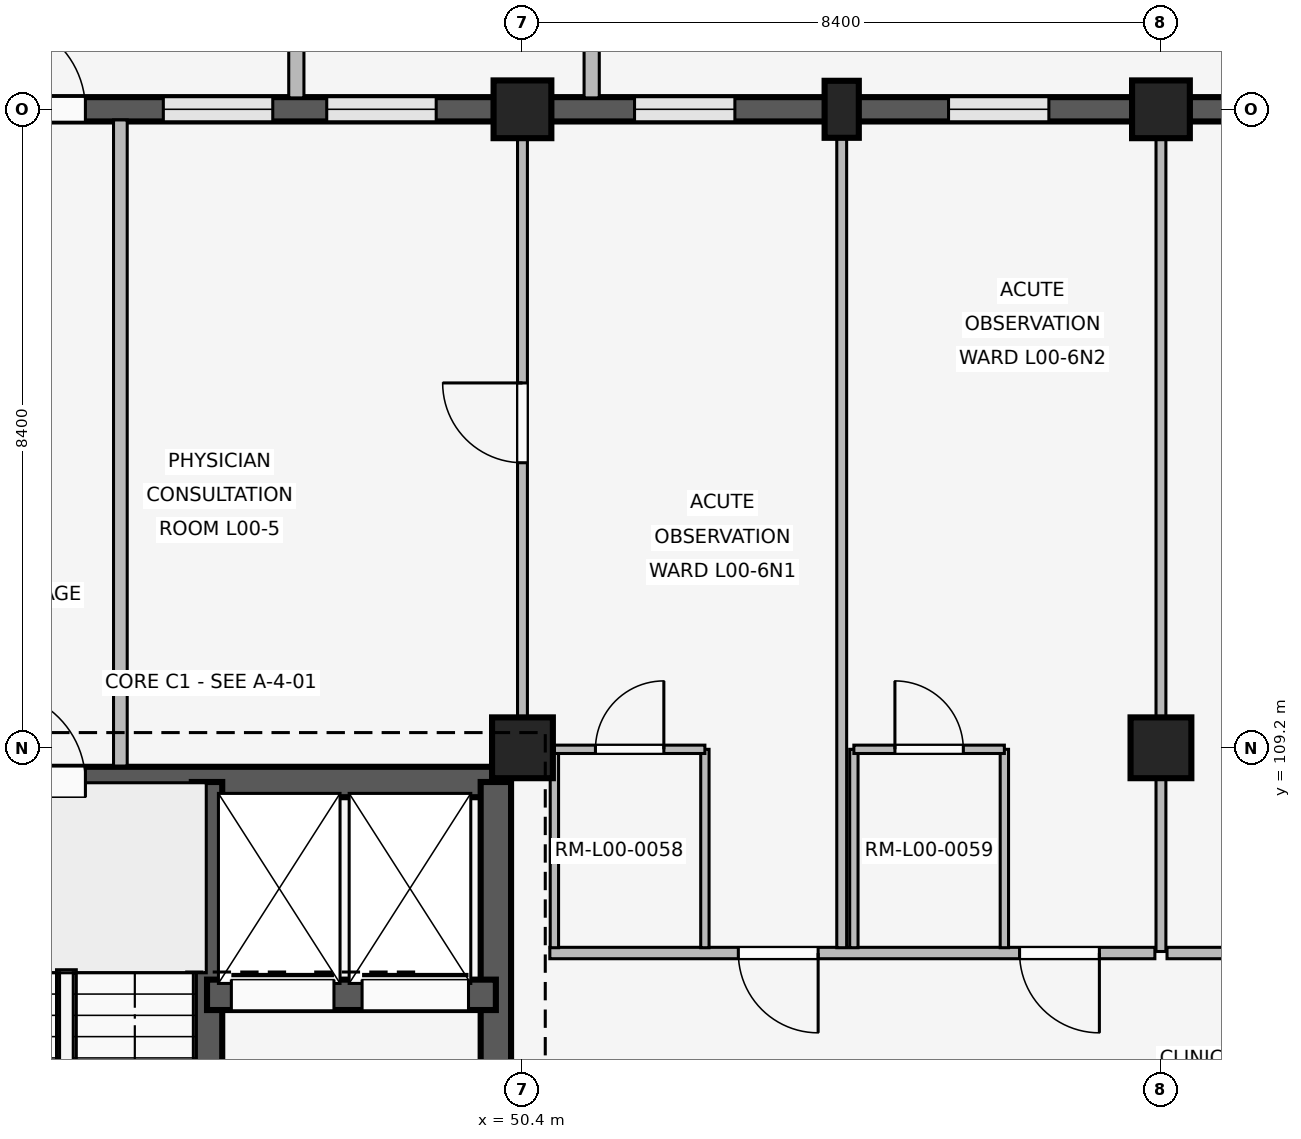
"""IFC4 building model, lengths in metres.
Left out: names, types, materials, properties, quantities, classifications, styles, units other than length and angle.
Written with IfcOpenShell. Run it as: python <this file> out.ifc"""

import sys

from ifc_helpers import new_model, si_unit, direction, frame, frame_2d, origin, origin_2d, place, context, subcontext, project, spatial, rectangle, extrude, element, fill, save


model = new_model("IFC4")
c1 = context("Model", 3, precision=1e-05, world=origin(), true_north=direction((0.0, 1.0)))
c2 = subcontext(c1, "Body", "Model", "MODEL_VIEW")
j1 = project(units=[si_unit("LENGTHUNIT", "METRE"), si_unit("PLANEANGLEUNIT", "RADIAN")], contexts=[c1])
p1 = place(None, origin())
s1 = spatial("IfcSite", under=j1, at=p1, CompositionType="ELEMENT")
p2 = place(p1, origin())
s2 = spatial("IfcBuilding", under=s1, at=p2, CompositionType="ELEMENT")
p3 = place(p2, origin())
s3 = spatial("IfcBuildingStorey", under=s2, at=p3, CompositionType="ELEMENT", Elevation=0.0)
p4 = place(p3, frame((50.4, 109.2, 0.0), z_axis=(0.0, 0.0, 1.0), x_axis=(1.0, 0.0, 0.0)))
e1 = element("IfcColumn", 1, at=p4, inside=s3, PredefinedType="COLUMN", context=c2, shape_type="SweptSolid", body=[
    extrude(rectangle(XDim=0.8, YDim=0.8, at=origin_2d()), origin(), (0.0, 0.0, 1.0), 4.8),
])
p5 = place(p3, frame((50.4, 117.6, 0.0), z_axis=(0.0, 0.0, 1.0), x_axis=(1.0, 0.0, 0.0)))
e2 = element("IfcColumn", 2, at=p5, inside=s3, PredefinedType="COLUMN", context=c2, shape_type="SweptSolid", body=[
    extrude(rectangle(XDim=0.76, YDim=0.76, at=origin_2d()), origin(), (0.0, 0.0, 1.0), 4.8),
])
p6 = place(p3, frame((58.8, 109.2, 0.0), z_axis=(0.0, 0.0, 1.0), x_axis=(1.0, 0.0, 0.0)))
e3 = element("IfcColumn", 3, at=p6, inside=s3, PredefinedType="COLUMN", context=c2, shape_type="SweptSolid", body=[
    extrude(rectangle(XDim=0.8, YDim=0.8, at=origin_2d()), origin(), (0.0, 0.0, 1.0), 4.8),
])
p7 = place(p3, frame((58.8, 117.6, 0.0), z_axis=(0.0, 0.0, 1.0), x_axis=(1.0, 0.0, 0.0)))
e4 = element("IfcColumn", 4, at=p7, inside=s3, PredefinedType="COLUMN", context=c2, shape_type="SweptSolid", body=[
    extrude(rectangle(XDim=0.76, YDim=0.76, at=origin_2d()), origin(), (0.0, 0.0, 1.0), 4.8),
])
p8 = place(p3, frame((54.6, 117.6, 0.0), z_axis=(0.0, 0.0, 1.0), x_axis=(1.0, 0.0, 0.0)))
e5 = element("IfcColumn", 5, at=p8, inside=s3, PredefinedType="PILASTER", context=c2, shape_type="SweptSolid", body=[
    extrude(rectangle(XDim=0.45, YDim=0.75, at=origin_2d()), origin(), (0.0, 0.0, 1.0), 4.8),
])
p9 = place(p3, frame((42.375, 117.6, 0.0), z_axis=(0.0, 0.0, 1.0), x_axis=(1.0, 0.0, 0.0)))
e6 = element("IfcWall", 6, at=p9, inside=s3, PredefinedType="SOLIDWALL", context=c2, shape_type="SweptSolid", body=[
    extrude(rectangle(XDim=7.65, YDim=0.32, at=frame_2d((3.825, 0.0))), origin(), (0.0, 0.0, 1.0), 3.82),
])
p10 = place(p9, frame((1.075, 0.0, 0.0)))
e7 = element("IfcOpeningElement", 7, at=p10, cuts=e6, PredefinedType="OPENING", context=c2, shape_type="SweptSolid", body=[
    extrude(rectangle(XDim=1.2, YDim=2.25, at=frame_2d((0.6, 1.125))), frame((0.0, 0.17, 0.0), z_axis=(0.0, -1.0, 0.0), x_axis=(1.0, 0.0, 0.0)), (0.0, 0.0, 1.0), 0.34),
])
p11 = place(p9, frame((3.3, 0.0, 0.85)))
e8 = element("IfcOpeningElement", 8, at=p11, cuts=e6, PredefinedType="OPENING", context=c2, shape_type="SweptSolid", body=[
    extrude(rectangle(XDim=1.44, YDim=1.62, at=frame_2d((0.72, 0.81))), frame((0.0, 0.17, 0.0), z_axis=(0.0, -1.0, 0.0), x_axis=(1.0, 0.0, 0.0)), (0.0, 0.0, 1.0), 0.34),
])
p12 = place(p9, frame((5.45, 0.0, 0.85)))
e9 = element("IfcOpeningElement", 9, at=p12, cuts=e6, PredefinedType="OPENING", context=c2, shape_type="SweptSolid", body=[
    extrude(rectangle(XDim=1.44, YDim=1.62, at=frame_2d((0.72, 0.81))), frame((0.0, 0.17, 0.0), z_axis=(0.0, -1.0, 0.0), x_axis=(1.0, 0.0, 0.0)), (0.0, 0.0, 1.0), 0.34),
])
p13 = place(p3, frame((47.425, 117.75, 0.0), z_axis=(0.0, 0.0, 1.0), x_axis=(0.0, 1.0, 0.0)))
e10 = element("IfcWall", 10, at=p13, inside=s3, PredefinedType="ELEMENTEDWALL", context=c2, shape_type="SweptSolid", body=[
    extrude(rectangle(XDim=0.85, YDim=0.2, at=frame_2d((0.425, 0.0))), origin(), (0.0, 0.0, 1.0), 3.8),
])
p14 = place(p3, frame((50.775, 117.6, 0.0), z_axis=(0.0, 0.0, 1.0), x_axis=(1.0, 0.0, 0.0)))
e11 = element("IfcWall", 11, at=p14, inside=s3, PredefinedType="SOLIDWALL", context=c2, shape_type="SweptSolid", body=[
    extrude(rectangle(XDim=7.65, YDim=0.32, at=frame_2d((3.825, 0.0))), origin(), (0.0, 0.0, 1.0), 3.82),
])
p15 = place(p14, frame((1.1, 0.0, 0.85)))
e12 = element("IfcOpeningElement", 12, at=p15, cuts=e11, PredefinedType="OPENING", context=c2, shape_type="SweptSolid", body=[
    extrude(rectangle(XDim=1.32, YDim=1.58, at=frame_2d((0.66, 0.79))), frame((0.0, 0.17, 0.0), z_axis=(0.0, -1.0, 0.0), x_axis=(1.0, 0.0, 0.0)), (0.0, 0.0, 1.0), 0.34),
])
p16 = place(p14, frame((5.23, 0.0, 0.85)))
e13 = element("IfcOpeningElement", 13, at=p16, cuts=e11, PredefinedType="OPENING", context=c2, shape_type="SweptSolid", body=[
    extrude(rectangle(XDim=1.32, YDim=1.58, at=frame_2d((0.66, 0.79))), frame((0.0, 0.17, 0.0), z_axis=(0.0, -1.0, 0.0), x_axis=(1.0, 0.0, 0.0)), (0.0, 0.0, 1.0), 0.34),
])
p17 = place(p3, frame((51.311, 117.75, 0.0), z_axis=(0.0, 0.0, 1.0), x_axis=(0.0, 1.0, 0.0)))
e14 = element("IfcWall", 14, at=p17, inside=s3, PredefinedType="ELEMENTEDWALL", context=c2, shape_type="SweptSolid", body=[
    extrude(rectangle(XDim=0.85, YDim=0.2, at=frame_2d((0.425, 0.0))), origin(), (0.0, 0.0, 1.0), 3.8),
])
p18 = place(p3, frame((59.175, 117.6, 0.0), z_axis=(0.0, 0.0, 1.0), x_axis=(1.0, 0.0, 0.0)))
e15 = element("IfcWall", 15, at=p18, inside=s3, PredefinedType="SOLIDWALL", context=c2, shape_type="SweptSolid", body=[
    extrude(rectangle(XDim=7.65, YDim=0.32, at=frame_2d((3.825, 0.0))), origin(), (0.0, 0.0, 1.0), 3.82),
])
p19 = place(p18, frame((2.825, 0.0, 0.0)))
e16 = element("IfcOpeningElement", 16, at=p19, cuts=e15, PredefinedType="OPENING", context=c2, shape_type="SweptSolid", body=[
    extrude(rectangle(XDim=2.0, YDim=2.4, at=frame_2d((1.0, 1.2))), frame((0.0, 0.17, 0.0), z_axis=(0.0, -1.0, 0.0), x_axis=(1.0, 0.0, 0.0)), (0.0, 0.0, 1.0), 0.34),
])
p20 = place(p3, frame((42.55, 108.75, 0.0), z_axis=(0.0, 0.0, 1.0), x_axis=(1.0, 0.0, 0.0)))
e17 = element("IfcWall", 17, at=p20, inside=s3, PredefinedType="SHEAR", context=c2, shape_type="SweptSolid", body=[
    extrude(rectangle(XDim=7.5, YDim=0.4, at=frame_2d((3.75, 0.0))), origin(), (0.0, 0.0, 1.0), 4.52),
])
p21 = place(p20, frame((0.9, 0.0, 0.0)))
e18 = element("IfcOpeningElement", 18, at=p21, cuts=e17, PredefinedType="OPENING", context=c2, shape_type="SweptSolid", body=[
    extrude(rectangle(XDim=1.2, YDim=2.1, at=frame_2d((0.6, 1.05))), frame((0.0, 0.21, 0.0), z_axis=(0.0, -1.0, 0.0), x_axis=(1.0, 0.0, 0.0)), (0.0, 0.0, 1.0), 0.42),
])
p22 = place(p3, frame((50.05, 101.2, 0.0), z_axis=(0.0, 0.0, 1.0), x_axis=(0.0, 1.0, 0.0)))
e19 = element("IfcWall", 19, at=p22, inside=s3, PredefinedType="SHEAR", context=c2, shape_type="SweptSolid", body=[
    extrude(rectangle(XDim=7.55, YDim=0.4, at=frame_2d((3.775, 0.0))), origin(), (0.0, 0.0, 1.0), 4.52),
])
p23 = place(p22, frame((2.4, 0.0, 0.0)))
e20 = element("IfcOpeningElement", 20, at=p23, cuts=e19, PredefinedType="OPENING", context=c2, shape_type="SweptSolid", body=[
    extrude(rectangle(XDim=1.2, YDim=2.2, at=frame_2d((0.6, 1.1))), frame((0.0, 0.21, 0.0), z_axis=(0.0, -1.0, 0.0), x_axis=(1.0, 0.0, 0.0)), (0.0, 0.0, 1.0), 0.42),
])
p24 = place(p3, frame((46.25, 101.2, 0.0), z_axis=(0.0, 0.0, 1.0), x_axis=(0.0, 1.0, 0.0)))
e21 = element("IfcWall", 21, at=p24, inside=s3, PredefinedType="SHEAR", context=c2, shape_type="SweptSolid", body=[
    extrude(rectangle(XDim=7.55, YDim=0.4, at=frame_2d((3.775, 0.0))), origin(), (0.0, 0.0, 1.0), 4.52),
])
p25 = place(p24, frame((0.28, 0.0, 0.0)))
e22 = element("IfcOpeningElement", 22, at=p25, cuts=e21, PredefinedType="OPENING", context=c2, shape_type="SweptSolid", body=[
    extrude(rectangle(XDim=1.0, YDim=2.15, at=frame_2d((0.5, 1.075))), frame((0.0, 0.21, 0.0), z_axis=(0.0, -1.0, 0.0), x_axis=(1.0, 0.0, 0.0)), (0.0, 0.0, 1.0), 0.42),
])
p26 = place(p3, frame((46.25, 105.95, 0.0), z_axis=(0.0, 0.0, 1.0), x_axis=(1.0, 0.0, 0.0)))
e23 = element("IfcWall", 23, at=p26, inside=s3, PredefinedType="SHEAR", context=c2, shape_type="SweptSolid", body=[
    extrude(rectangle(XDim=3.8, YDim=0.4, at=frame_2d((1.9, 0.0))), origin(), (0.0, 0.0, 1.0), 4.52),
])
p27 = place(p26, frame((0.32, 0.0, 0.0)))
e24 = element("IfcOpeningElement", 24, at=p27, cuts=e23, PredefinedType="OPENING", context=c2, shape_type="SweptSolid", body=[
    extrude(rectangle(XDim=1.35, YDim=2.25, at=frame_2d((0.675, 1.125))), frame((0.0, 0.21, 0.0), z_axis=(0.0, -1.0, 0.0), x_axis=(1.0, 0.0, 0.0)), (0.0, 0.0, 1.0), 0.42),
])
p28 = place(p26, frame((2.04, 0.0, 0.0)))
e25 = element("IfcOpeningElement", 25, at=p28, cuts=e23, PredefinedType="OPENING", context=c2, shape_type="SweptSolid", body=[
    extrude(rectangle(XDim=1.4, YDim=2.25, at=frame_2d((0.7, 1.125))), frame((0.0, 0.21, 0.0), z_axis=(0.0, -1.0, 0.0), x_axis=(1.0, 0.0, 0.0)), (0.0, 0.0, 1.0), 0.42),
])
p29 = place(p3, frame((45.11, 108.96, 0.0), z_axis=(0.0, 0.0, 1.0), x_axis=(0.0, 1.0, 0.0)))
e26 = element("IfcWall", 26, at=p29, inside=s3, PredefinedType="PARTITIONING", context=c2, shape_type="SweptSolid", body=[
    extrude(rectangle(XDim=8.5, YDim=0.18, at=frame_2d((4.25, 0.0))), origin(), (0.0, 0.0, 1.0), 3.8),
])
p30 = place(p3, frame((50.4, 109.55, 0.0), z_axis=(0.0, 0.0, 1.0), x_axis=(0.0, 1.0, 0.0)))
e27 = element("IfcWall", 27, at=p30, inside=s3, PredefinedType="PARTITIONING", context=c2, shape_type="SweptSolid", body=[
    extrude(rectangle(XDim=7.91, YDim=0.13, at=frame_2d((3.955, 0.0))), origin(), (0.0, 0.0, 1.0), 3.8),
])
p31 = place(p30, frame((3.4, 0.0, 0.0)))
e28 = element("IfcOpeningElement", 28, at=p31, cuts=e27, PredefinedType="OPENING", context=c2, shape_type="SweptSolid", body=[
    extrude(rectangle(XDim=1.05, YDim=2.2, at=frame_2d((0.525, 1.1))), frame((0.0, 0.075, 0.0), z_axis=(0.0, -1.0, 0.0), x_axis=(1.0, 0.0, 0.0)), (0.0, 0.0, 1.0), 0.15),
])
p32 = place(p3, frame((58.72, 106.5, 0.0), z_axis=(0.0, 0.0, 1.0), x_axis=(-1.0, 0.0, 0.0)))
e29 = element("IfcWall", 29, at=p32, inside=s3, PredefinedType="PARTITIONING", context=c2, shape_type="SweptSolid", body=[
    extrude(rectangle(XDim=7.96, YDim=0.15, at=frame_2d((3.98, 0.0))), origin(), (0.0, 0.0, 1.0), 3.8),
])
p33 = place(p32, frame((0.73, 0.0, 0.0)))
e30 = element("IfcOpeningElement", 30, at=p33, cuts=e29, PredefinedType="OPENING", context=c2, shape_type="SweptSolid", body=[
    extrude(rectangle(XDim=1.05, YDim=2.2, at=frame_2d((0.525, 1.1))), frame((0.0, 0.085, 0.0), z_axis=(0.0, -1.0, 0.0), x_axis=(1.0, 0.0, 0.0)), (0.0, 0.0, 1.0), 0.17),
])
p34 = place(p32, frame((4.43, 0.0, 0.0)))
e31 = element("IfcOpeningElement", 31, at=p34, cuts=e29, PredefinedType="OPENING", context=c2, shape_type="SweptSolid", body=[
    extrude(rectangle(XDim=1.05, YDim=2.2, at=frame_2d((0.525, 1.1))), frame((0.0, 0.085, 0.0), z_axis=(0.0, -1.0, 0.0), x_axis=(1.0, 0.0, 0.0)), (0.0, 0.0, 1.0), 0.17),
])
p35 = place(p3, frame((54.6, 106.57, 0.0), z_axis=(0.0, 0.0, 1.0), x_axis=(0.0, 1.0, 0.0)))
e32 = element("IfcWall", 32, at=p35, inside=s3, PredefinedType="PARTITIONING", context=c2, shape_type="SweptSolid", body=[
    extrude(rectangle(XDim=10.93, YDim=0.13, at=frame_2d((5.465, 0.0))), origin(), (0.0, 0.0, 1.0), 3.8),
])
for number, where, z_axis, x_axis in (
    (33, (50.82, 106.57, 0.0), (0.0, 0.0, 1.0), (0.0, 1.0, 0.0)),
    (34, (52.8, 106.57, 0.0), (0.0, 0.0, 1.0), (0.0, 1.0, 0.0)),
):
    element("IfcWall", number, at=place(p3, frame(where, z_axis=z_axis, x_axis=x_axis)), inside=s3, PredefinedType="PARTITIONING", context=c2, shape_type="SweptSolid", body=[
        extrude(rectangle(XDim=2.61, YDim=0.11, at=frame_2d((1.305, 0.0))), origin(), (0.0, 0.0, 1.0), 3.8),
    ])
p36 = place(p3, frame((50.82, 109.18, 0.0), z_axis=(0.0, 0.0, 1.0), x_axis=(1.0, 0.0, 0.0)))
e35 = element("IfcWall", 35, at=p36, inside=s3, PredefinedType="PARTITIONING", context=c2, shape_type="SweptSolid", body=[
    extrude(rectangle(XDim=1.98, YDim=0.11, at=frame_2d((0.99, 0.0))), origin(), (0.0, 0.0, 1.0), 3.8),
])
p37 = place(p36, frame((0.54, 0.0, 0.0)))
e36 = element("IfcOpeningElement", 36, at=p37, cuts=e35, PredefinedType="OPENING", context=c2, shape_type="SweptSolid", body=[
    extrude(rectangle(XDim=0.9, YDim=2.1, at=frame_2d((0.45, 1.05))), frame((0.0, 0.065, 0.0), z_axis=(0.0, -1.0, 0.0), x_axis=(1.0, 0.0, 0.0)), (0.0, 0.0, 1.0), 0.13),
])
for number, where, z_axis, x_axis in (
    (37, (54.76, 106.57, 0.0), (0.0, 0.0, 1.0), (0.0, 1.0, 0.0)),
    (38, (56.74, 106.57, 0.0), (0.0, 0.0, 1.0), (0.0, 1.0, 0.0)),
):
    element("IfcWall", number, at=place(p3, frame(where, z_axis=z_axis, x_axis=x_axis)), inside=s3, PredefinedType="PARTITIONING", context=c2, shape_type="SweptSolid", body=[
        extrude(rectangle(XDim=2.61, YDim=0.11, at=frame_2d((1.305, 0.0))), origin(), (0.0, 0.0, 1.0), 3.8),
    ])
p38 = place(p3, frame((54.76, 109.18, 0.0), z_axis=(0.0, 0.0, 1.0), x_axis=(1.0, 0.0, 0.0)))
e39 = element("IfcWall", 39, at=p38, inside=s3, PredefinedType="PARTITIONING", context=c2, shape_type="SweptSolid", body=[
    extrude(rectangle(XDim=1.98, YDim=0.11, at=frame_2d((0.99, 0.0))), origin(), (0.0, 0.0, 1.0), 3.8),
])
p39 = place(p38, frame((0.54, 0.0, 0.0)))
e40 = element("IfcOpeningElement", 40, at=p39, cuts=e39, PredefinedType="OPENING", context=c2, shape_type="SweptSolid", body=[
    extrude(rectangle(XDim=0.9, YDim=2.1, at=frame_2d((0.45, 1.05))), frame((0.0, 0.065, 0.0), z_axis=(0.0, -1.0, 0.0), x_axis=(1.0, 0.0, 0.0)), (0.0, 0.0, 1.0), 0.13),
])
p40 = place(p3, frame((58.8, 106.52, 0.0), z_axis=(0.0, 0.0, 1.0), x_axis=(0.0, 1.0, 0.0)))
e41 = element("IfcWall", 41, at=p40, inside=s3, PredefinedType="PARTITIONING", context=c2, shape_type="SweptSolid", body=[
    extrude(rectangle(XDim=10.94, YDim=0.13, at=frame_2d((5.47, 0.0))), origin(), (0.0, 0.0, 1.0), 3.8),
])
p41 = place(p3, frame((67.12, 106.5, 0.0), z_axis=(0.0, 0.0, 1.0), x_axis=(-1.0, 0.0, 0.0)))
e42 = element("IfcWall", 42, at=p41, inside=s3, PredefinedType="PARTITIONING", context=c2, shape_type="SweptSolid", body=[
    extrude(rectangle(XDim=8.24, YDim=0.15, at=frame_2d((4.12, 0.0))), origin(), (0.0, 0.0, 1.0), 3.8),
])
p42 = place(p41, frame((1.25, 0.0, 0.0)))
e43 = element("IfcOpeningElement", 43, at=p42, cuts=e42, PredefinedType="OPENING", context=c2, shape_type="SweptSolid", body=[
    extrude(rectangle(XDim=1.25, YDim=2.2, at=frame_2d((0.625, 1.1))), frame((0.0, 0.085, 0.0), z_axis=(0.0, -1.0, 0.0), x_axis=(1.0, 0.0, 0.0)), (0.0, 0.0, 1.0), 0.17),
])
p43 = place(p10, origin())
e44 = element("IfcDoor", 44, at=p43, inside=s3, OperationType="SINGLE_SWING_LEFT", PredefinedType="DOOR", context=c2, shape_type="SweptSolid", body=[
    extrude(rectangle(XDim=1.2, YDim=2.25, at=frame_2d((0.6, 1.125))), frame((0.0, 0.025, 0.0), z_axis=(0.0, -1.0, 0.0), x_axis=(1.0, 0.0, 0.0)), (0.0, 0.0, 1.0), 0.05),
])
fill(e7, e44)
p44 = place(p11, origin())
e45 = element("IfcWindow", 45, at=p44, inside=s3, PartitioningType="SINGLE_PANEL", PredefinedType="WINDOW", context=c2, shape_type="SweptSolid", body=[
    extrude(rectangle(XDim=1.44, YDim=1.62, at=frame_2d((0.72, 0.81))), frame((0.0, 0.03, 0.0), z_axis=(0.0, -1.0, 0.0), x_axis=(1.0, 0.0, 0.0)), (0.0, 0.0, 1.0), 0.06),
])
fill(e8, e45)
p45 = place(p12, origin())
e46 = element("IfcWindow", 46, at=p45, inside=s3, PartitioningType="SINGLE_PANEL", PredefinedType="WINDOW", context=c2, shape_type="SweptSolid", body=[
    extrude(rectangle(XDim=1.44, YDim=1.62, at=frame_2d((0.72, 0.81))), frame((0.0, 0.03, 0.0), z_axis=(0.0, -1.0, 0.0), x_axis=(1.0, 0.0, 0.0)), (0.0, 0.0, 1.0), 0.06),
])
fill(e9, e46)
p46 = place(p15, origin())
e47 = element("IfcWindow", 47, at=p46, inside=s3, PartitioningType="SINGLE_PANEL", PredefinedType="WINDOW", context=c2, shape_type="SweptSolid", body=[
    extrude(rectangle(XDim=1.32, YDim=1.58, at=frame_2d((0.66, 0.79))), frame((0.0, 0.03, 0.0), z_axis=(0.0, -1.0, 0.0), x_axis=(1.0, 0.0, 0.0)), (0.0, 0.0, 1.0), 0.06),
])
fill(e12, e47)
p47 = place(p16, origin())
e48 = element("IfcWindow", 48, at=p47, inside=s3, PartitioningType="SINGLE_PANEL", PredefinedType="WINDOW", context=c2, shape_type="SweptSolid", body=[
    extrude(rectangle(XDim=1.32, YDim=1.58, at=frame_2d((0.66, 0.79))), frame((0.0, 0.03, 0.0), z_axis=(0.0, -1.0, 0.0), x_axis=(1.0, 0.0, 0.0)), (0.0, 0.0, 1.0), 0.06),
])
fill(e13, e48)
p48 = place(p21, origin())
e49 = element("IfcDoor", 49, at=p48, inside=s3, OperationType="SINGLE_SWING_LEFT", PredefinedType="DOOR", context=c2, shape_type="SweptSolid", body=[
    extrude(rectangle(XDim=1.2, YDim=2.1, at=frame_2d((0.6, 1.05))), frame((0.0, 0.025, 0.0), z_axis=(0.0, -1.0, 0.0), x_axis=(1.0, 0.0, 0.0)), (0.0, 0.0, 1.0), 0.05),
])
fill(e18, e49)
p49 = place(p27, origin())
e50 = element("IfcDoor", 50, at=p49, inside=s3, OperationType="SLIDING_TO_LEFT", PredefinedType="DOOR", context=c2, shape_type="SweptSolid", body=[
    extrude(rectangle(XDim=1.35, YDim=2.25, at=frame_2d((0.675, 1.125))), frame((0.0, 0.025, 0.0), z_axis=(0.0, -1.0, 0.0), x_axis=(1.0, 0.0, 0.0)), (0.0, 0.0, 1.0), 0.05),
])
fill(e24, e50)
p50 = place(p28, origin())
e51 = element("IfcDoor", 51, at=p50, inside=s3, OperationType="SLIDING_TO_LEFT", PredefinedType="DOOR", context=c2, shape_type="SweptSolid", body=[
    extrude(rectangle(XDim=1.4, YDim=2.25, at=frame_2d((0.7, 1.125))), frame((0.0, 0.025, 0.0), z_axis=(0.0, -1.0, 0.0), x_axis=(1.0, 0.0, 0.0)), (0.0, 0.0, 1.0), 0.05),
])
fill(e25, e51)
p51 = place(p31, origin())
e52 = element("IfcDoor", 52, at=p51, inside=s3, OperationType="SINGLE_SWING_RIGHT", PredefinedType="DOOR", context=c2, shape_type="SweptSolid", body=[
    extrude(rectangle(XDim=1.05, YDim=2.2, at=frame_2d((0.525, 1.1))), frame((0.0, 0.025, 0.0), z_axis=(0.0, -1.0, 0.0), x_axis=(1.0, 0.0, 0.0)), (0.0, 0.0, 1.0), 0.05),
])
fill(e28, e52)
p52 = place(p33, origin())
e53 = element("IfcDoor", 53, at=p52, inside=s3, OperationType="SINGLE_SWING_LEFT", PredefinedType="DOOR", context=c2, shape_type="SweptSolid", body=[
    extrude(rectangle(XDim=1.05, YDim=2.2, at=frame_2d((0.525, 1.1))), frame((0.0, 0.025, 0.0), z_axis=(0.0, -1.0, 0.0), x_axis=(1.0, 0.0, 0.0)), (0.0, 0.0, 1.0), 0.05),
])
fill(e30, e53)
p53 = place(p34, origin())
e54 = element("IfcDoor", 54, at=p53, inside=s3, OperationType="SINGLE_SWING_LEFT", PredefinedType="DOOR", context=c2, shape_type="SweptSolid", body=[
    extrude(rectangle(XDim=1.05, YDim=2.2, at=frame_2d((0.525, 1.1))), frame((0.0, 0.025, 0.0), z_axis=(0.0, -1.0, 0.0), x_axis=(1.0, 0.0, 0.0)), (0.0, 0.0, 1.0), 0.05),
])
fill(e31, e54)
p54 = place(p37, origin())
e55 = element("IfcDoor", 55, at=p54, inside=s3, OperationType="SINGLE_SWING_RIGHT", PredefinedType="DOOR", context=c2, shape_type="SweptSolid", body=[
    extrude(rectangle(XDim=0.9, YDim=2.1, at=frame_2d((0.45, 1.05))), frame((0.0, 0.025, 0.0), z_axis=(0.0, -1.0, 0.0), x_axis=(1.0, 0.0, 0.0)), (0.0, 0.0, 1.0), 0.05),
])
fill(e36, e55)
p55 = place(p39, origin())
e56 = element("IfcDoor", 56, at=p55, inside=s3, OperationType="SINGLE_SWING_LEFT", PredefinedType="DOOR", context=c2, shape_type="SweptSolid", body=[
    extrude(rectangle(XDim=0.9, YDim=2.1, at=frame_2d((0.45, 1.05))), frame((0.0, 0.025, 0.0), z_axis=(0.0, -1.0, 0.0), x_axis=(1.0, 0.0, 0.0)), (0.0, 0.0, 1.0), 0.05),
])
fill(e40, e56)
save(model, sys.argv[1])
